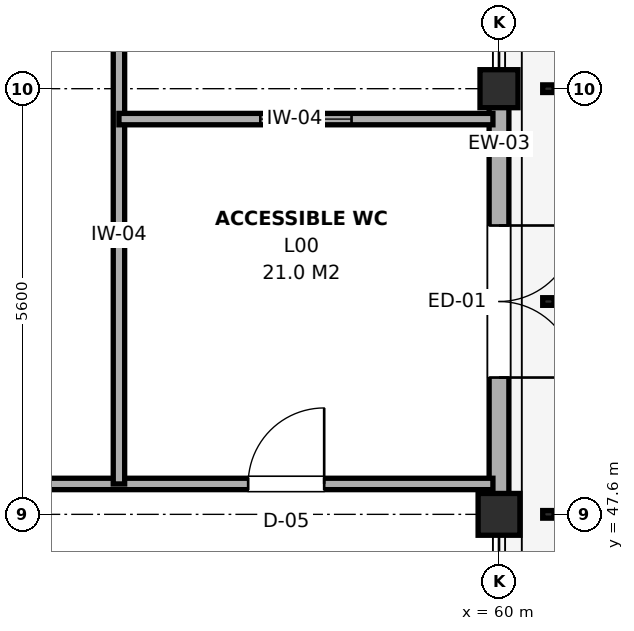
"""IFC4 building model, lengths in metres.
Left out: names, types, materials, properties, quantities, classifications, styles, units other than length and angle.
Written with IfcOpenShell. Run it as: python <this file> out.ifc"""

import sys

from ifc_helpers import new_model, si_unit, direction, frame, frame_2d, origin, origin_2d, place, context, subcontext, project, spatial, rectangle, hollow_rectangle, extrude, element, fill, save


model = new_model("IFC4")
c1 = context("Model", 3, precision=1e-05, world=origin(), true_north=direction((0.0, 1.0)))
c2 = subcontext(c1, "Body", "Model", "MODEL_VIEW")
j1 = project(units=[si_unit("LENGTHUNIT", "METRE"), si_unit("PLANEANGLEUNIT", "RADIAN")], contexts=[c1])
p1 = place(None, origin())
s1 = spatial("IfcSite", under=j1, at=p1, CompositionType="ELEMENT")
p2 = place(p1, origin())
s2 = spatial("IfcBuilding", under=s1, at=p2, CompositionType="ELEMENT")
p3 = place(p2, origin())
s3 = spatial("IfcBuildingStorey", under=s2, at=p3, CompositionType="ELEMENT", Elevation=0.0)
p4 = place(p3, frame((60.0, 47.6, 0.0), z_axis=(0.0, 0.0, 1.0), x_axis=(1.0, 0.0, 0.0)))
e1 = element("IfcColumn", 1, at=p4, inside=s3, PredefinedType="COLUMN", context=c2, shape_type="SweptSolid", body=[
    extrude(rectangle(XDim=0.55, YDim=0.55, at=origin_2d()), origin(), (0.0, 0.0, 1.0), 4.8),
])
p5 = place(p3, frame((60.0, 53.2, 0.0), z_axis=(0.0, 0.0, 1.0), x_axis=(1.0, 0.0, 0.0)))
e2 = element("IfcColumn", 2, at=p5, inside=s3, PredefinedType="COLUMN", context=c2, shape_type="SweptSolid", body=[
    extrude(rectangle(XDim=0.5, YDim=0.5, at=origin_2d()), origin(), (0.0, 0.0, 1.0), 4.8),
])
p6 = place(p3, frame((60.0, 47.6, 0.0), z_axis=(0.0, 0.0, 1.0), x_axis=(0.0, 1.0, 0.0)))
e3 = element("IfcWall", 3, at=p6, inside=s3, PredefinedType="SOLIDWALL", context=c2, shape_type="SweptSolid", body=[
    extrude(rectangle(XDim=5.6, YDim=0.26, at=frame_2d((2.8, 0.0))), origin(), (0.0, 0.0, 1.0), 4.205),
])
p7 = place(p6, frame((1.8, 0.0, 0.0)))
e4 = element("IfcOpeningElement", 4, at=p7, cuts=e3, PredefinedType="OPENING", context=c2, shape_type="SweptSolid", body=[
    extrude(rectangle(XDim=2.0, YDim=2.25, at=frame_2d((1.0, 1.125))), frame((0.0, 0.145, 0.0), z_axis=(0.0, -1.0, 0.0), x_axis=(1.0, 0.0, 0.0)), (0.0, 0.0, 1.0), 0.29),
])
for number, where, z_axis, x_axis in (
    (5, (60.65, 47.6, 0.0), (0.0, 0.0, 1.0), (1.0, 0.0, 0.0)),
    (6, (60.65, 50.4, 0.0), (0.0, 0.0, 1.0), (1.0, 0.0, 0.0)),
    (7, (60.65, 53.2, 0.0), (0.0, 0.0, 1.0), (1.0, 0.0, 0.0)),
):
    element("IfcColumn", number, at=place(p3, frame(where, z_axis=z_axis, x_axis=x_axis)), inside=s3, PredefinedType="COLUMN", context=c2, shape_type="SweptSolid", body=[
        extrude(hollow_rectangle(XDim=0.15, YDim=0.1, WallThickness=0.008, at=origin_2d()), origin(), (0.0, 0.0, 1.0), 4.8),
    ])
p8 = place(p3, frame((50.0, 48.0, 0.0), z_axis=(0.0, 0.0, 1.0), x_axis=(1.0, 0.0, 0.0)))
e8 = element("IfcWall", 8, at=p8, inside=s3, PredefinedType="PARTITIONING", context=c2, shape_type="SweptSolid", body=[
    extrude(rectangle(XDim=9.92, YDim=0.15, at=frame_2d((4.96, 0.0))), origin(), (0.0, 0.0, 1.0), 4.205),
])
p9 = place(p8, frame((6.7, 0.0, 0.0)))
e9 = element("IfcOpeningElement", 9, at=p9, cuts=e8, PredefinedType="OPENING", context=c2, shape_type="SweptSolid", body=[
    extrude(rectangle(XDim=1.0, YDim=2.15, at=frame_2d((0.5, 1.075))), frame((0.0, 0.09, 0.0), z_axis=(0.0, -1.0, 0.0), x_axis=(1.0, 0.0, 0.0)), (0.0, 0.0, 1.0), 0.18),
])
p10 = place(p3, frame((55.0, 48.0, 0.0), z_axis=(0.0, 0.0, 1.0), x_axis=(0.0, 1.0, 0.0)))
e10 = element("IfcWall", 10, at=p10, inside=s3, PredefinedType="PARTITIONING", context=c2, shape_type="SweptSolid", body=[
    extrude(rectangle(XDim=10.72, YDim=0.15, at=frame_2d((5.36, 0.0))), origin(), (0.0, 0.0, 1.0), 4.225),
])
p11 = place(p10, frame((7.325, 0.0, 0.0)))
e11 = element("IfcOpeningElement", 11, at=p11, cuts=e10, PredefinedType="OPENING", context=c2, shape_type="SweptSolid", body=[
    extrude(rectangle(XDim=0.95, YDim=2.15, at=frame_2d((0.475, 1.075))), frame((0.0, 0.09, 0.0), z_axis=(0.0, -1.0, 0.0), x_axis=(1.0, 0.0, 0.0)), (0.0, 0.0, 1.0), 0.18),
])
p12 = place(p3, frame((55.0, 52.8, 0.0), z_axis=(0.0, 0.0, 1.0), x_axis=(1.0, 0.0, 0.0)))
e12 = element("IfcWall", 12, at=p12, inside=s3, PredefinedType="PARTITIONING", context=c2, shape_type="SweptSolid", body=[
    extrude(rectangle(XDim=4.92, YDim=0.15, at=frame_2d((2.46, 0.0))), origin(), (0.0, 0.0, 1.0), 4.205),
])
p13 = place(p12, frame((1.86, 0.0, 0.95)))
e13 = element("IfcOpeningElement", 13, at=p13, cuts=e12, PredefinedType="OPENING", context=c2, shape_type="SweptSolid", body=[
    extrude(rectangle(XDim=1.2, YDim=1.5, at=frame_2d((0.6, 0.75))), frame((0.0, 0.09, 0.0), z_axis=(0.0, -1.0, 0.0), x_axis=(1.0, 0.0, 0.0)), (0.0, 0.0, 1.0), 0.18),
])
p14 = place(p7, frame((2.0, 0.0, 0.0), z_axis=(0.0, 0.0, 1.0), x_axis=(-1.0, 0.0, 0.0)))
e14 = element("IfcDoor", 14, at=p14, inside=s3, OperationType="DOUBLE_DOOR_SINGLE_SWING", PredefinedType="DOOR", context=c2, shape_type="SweptSolid", body=[
    extrude(rectangle(XDim=2.0, YDim=2.25, at=frame_2d((1.0, 1.125))), frame((0.0, 0.025, 0.0), z_axis=(0.0, -1.0, 0.0), x_axis=(1.0, 0.0, 0.0)), (0.0, 0.0, 1.0), 0.05),
])
fill(e4, e14)
p15 = place(p9, origin())
e15 = element("IfcDoor", 15, at=p15, inside=s3, OperationType="SINGLE_SWING_RIGHT", PredefinedType="DOOR", context=c2, shape_type="SweptSolid", body=[
    extrude(rectangle(XDim=1.0, YDim=2.15, at=frame_2d((0.5, 1.075))), frame((0.0, 0.025, 0.0), z_axis=(0.0, -1.0, 0.0), x_axis=(1.0, 0.0, 0.0)), (0.0, 0.0, 1.0), 0.05),
])
fill(e9, e15)
p16 = place(p13, origin())
e16 = element("IfcWindow", 16, at=p16, inside=s3, PartitioningType="SINGLE_PANEL", PredefinedType="WINDOW", context=c2, shape_type="SweptSolid", body=[
    extrude(rectangle(XDim=1.2, YDim=1.5, at=frame_2d((0.6, 0.75))), frame((0.0, 0.03, 0.0), z_axis=(0.0, -1.0, 0.0), x_axis=(1.0, 0.0, 0.0)), (0.0, 0.0, 1.0), 0.06),
])
fill(e13, e16)
save(model, sys.argv[1])
